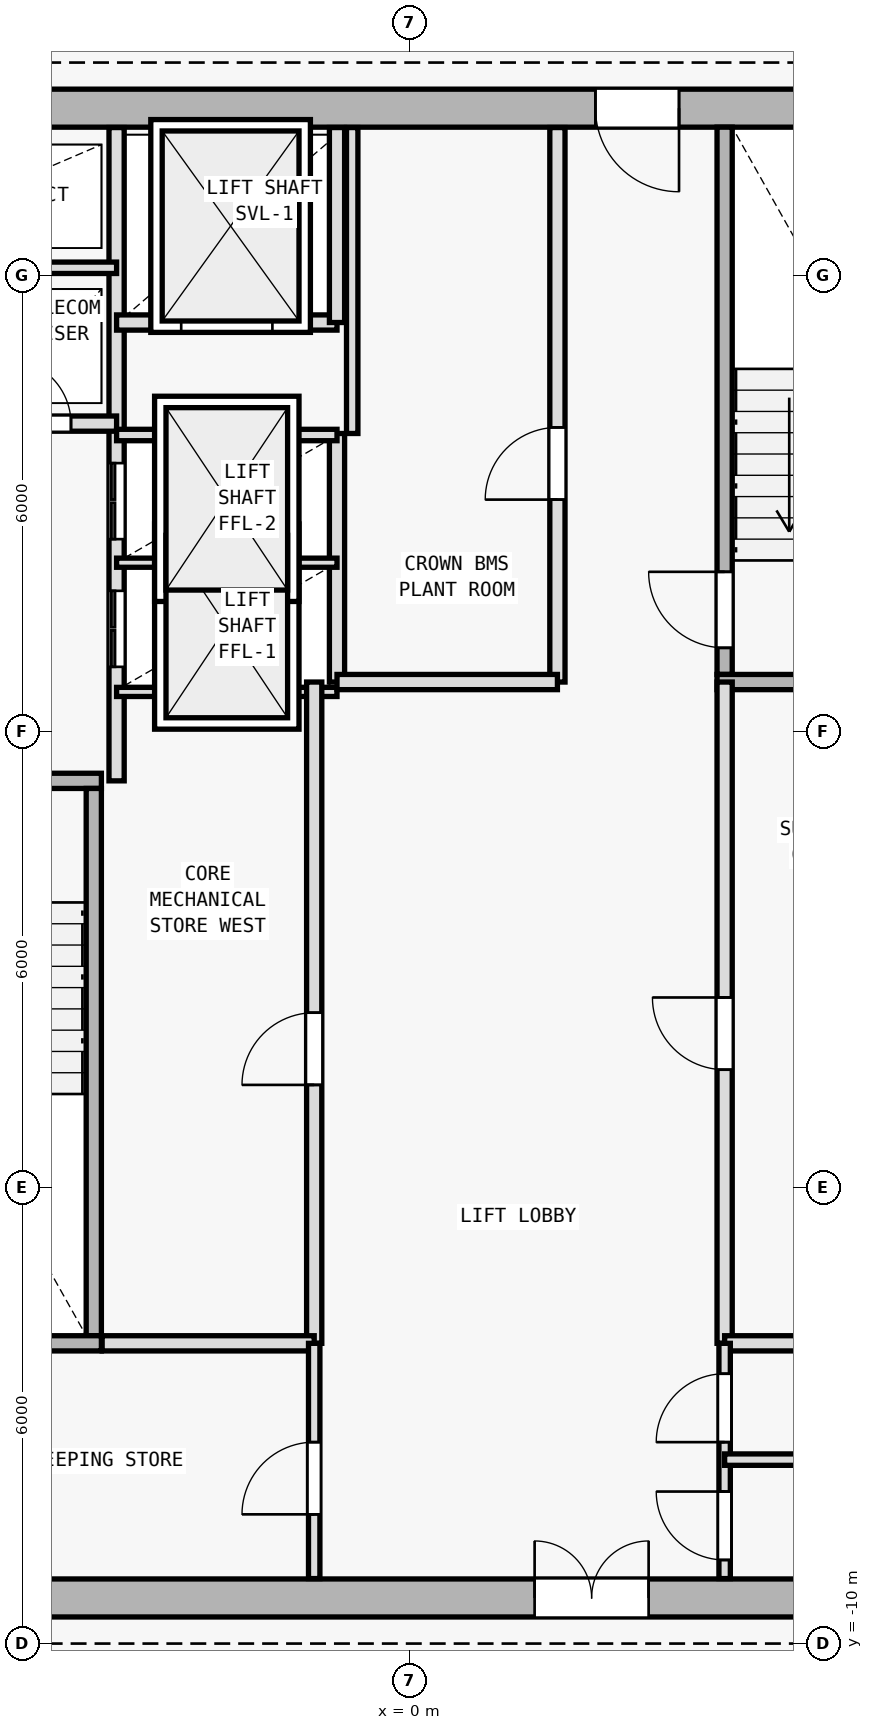
"""IFC4 building model, lengths in metres.
Left out: names, types, materials, properties, quantities, classifications, styles, units other than length and angle.
Written with IfcOpenShell. Run it as: python <this file> out.ifc"""

import sys

from ifc_helpers import new_model, si_unit, direction, frame, frame_2d, origin, origin_2d, place, context, subcontext, project, spatial, rectangle, i_section, extrude, element, fill, save


model = new_model("IFC4")
c1 = context("Model", 3, precision=1e-05, world=origin(), true_north=direction((0.0, 1.0)))
c2 = subcontext(c1, "Body", "Model", "MODEL_VIEW")
j1 = project(units=[si_unit("LENGTHUNIT", "METRE"), si_unit("PLANEANGLEUNIT", "RADIAN")], contexts=[c1])
p1 = place(None, origin())
s1 = spatial("IfcSite", under=j1, at=p1, CompositionType="ELEMENT")
p2 = place(p1, origin())
s2 = spatial("IfcBuilding", under=s1, at=p2, CompositionType="ELEMENT")
p3 = place(p2, frame((0.0, 0.0, 315.6)))
s3 = spatial("IfcBuildingStorey", under=s2, at=p3, CompositionType="ELEMENT", Elevation=315.6)
p4 = place(p3, frame((0.0, -9.4, 0.0), z_axis=(0.0, 0.0, 1.0), x_axis=(1.0, 0.0, 0.0)))
e1 = element("IfcColumn", 1, at=p4, inside=s3, PredefinedType="COLUMN", context=c2, shape_type="SweptSolid", body=[
    extrude(i_section(OverallWidth=0.374, OverallDepth=0.372, WebThickness=0.012, FlangeThickness=0.02, FilletRadius=0.015, at=origin_2d()), origin(), (0.0, 0.0, 1.0), 3.6),
])
p5 = place(p3, frame((-7.95, -9.4, 0.0), z_axis=(0.0, 0.0, 1.0), x_axis=(1.0, 0.0, 0.0)))
e2 = element("IfcWall", 2, at=p5, inside=s3, PredefinedType="SHEAR", context=c2, shape_type="SweptSolid", body=[
    extrude(rectangle(XDim=15.9, YDim=0.5, at=frame_2d((7.95, 0.0))), origin(), (0.0, 0.0, 1.0), 3.34),
])
p6 = place(p5, frame((9.6, 0.0, 0.0)))
e3 = element("IfcOpeningElement", 3, at=p6, cuts=e2, PredefinedType="OPENING", context=c2, shape_type="SweptSolid", body=[
    extrude(rectangle(XDim=1.5, YDim=2.2, at=frame_2d((0.75, 1.1))), frame((0.0, 0.26, 0.0), z_axis=(0.0, -1.0, 0.0), x_axis=(1.0, 0.0, 0.0)), (0.0, 0.0, 1.0), 0.52),
])
p7 = place(p3, frame((7.95, 10.2, 0.0), z_axis=(0.0, 0.0, 1.0), x_axis=(-1.0, 0.0, 0.0)))
e4 = element("IfcWall", 4, at=p7, inside=s3, PredefinedType="SHEAR", context=c2, shape_type="SweptSolid", body=[
    extrude(rectangle(XDim=15.9, YDim=0.5, at=frame_2d((7.95, 0.0))), origin(), (0.0, 0.0, 1.0), 3.34),
])
p8 = place(p7, frame((4.4, 0.0, 0.0)))
e5 = element("IfcOpeningElement", 5, at=p8, cuts=e4, PredefinedType="OPENING", context=c2, shape_type="SweptSolid", body=[
    extrude(rectangle(XDim=1.1, YDim=2.15, at=frame_2d((0.55, 1.075))), frame((0.0, 0.26, 0.0), z_axis=(0.0, -1.0, 0.0), x_axis=(1.0, 0.0, 0.0)), (0.0, 0.0, 1.0), 0.52),
])
p9 = place(p3, frame((-7.45, 1.35, 0.0), z_axis=(0.0, 0.0, 1.0), x_axis=(1.0, 0.0, 0.0)))
e6 = element("IfcWall", 6, at=p9, inside=s3, PredefinedType="SOLIDWALL", context=c2, shape_type="SweptSolid", body=[
    extrude(rectangle(XDim=3.4, YDim=0.2, at=frame_2d((1.7, 0.0))), origin(), (0.0, 0.0, 1.0), 3.34),
])
p10 = place(p9, frame((0.65, 0.0, 0.0)))
e7 = element("IfcOpeningElement", 7, at=p10, cuts=e6, PredefinedType="OPENING", context=c2, shape_type="SweptSolid", body=[
    extrude(rectangle(XDim=1.0, YDim=2.15, at=frame_2d((0.5, 1.075))), frame((0.0, 0.11, 0.0), z_axis=(0.0, -1.0, 0.0), x_axis=(1.0, 0.0, 0.0)), (0.0, 0.0, 1.0), 0.22),
])
p11 = place(p3, frame((-4.15, -5.95, 0.0), z_axis=(0.0, 0.0, 1.0), x_axis=(0.0, 1.0, 0.0)))
e8 = element("IfcWall", 8, at=p11, inside=s3, PredefinedType="SOLIDWALL", context=c2, shape_type="SweptSolid", body=[
    extrude(rectangle(XDim=7.2, YDim=0.2, at=frame_2d((3.6, 0.0))), origin(), (0.0, 0.0, 1.0), 3.34),
])
p12 = place(p3, frame((-3.85, 1.35, 0.0), z_axis=(0.0, 0.0, 1.0), x_axis=(0.0, 1.0, 0.0)))
e9 = element("IfcWall", 9, at=p12, inside=s3, PredefinedType="SOLIDWALL", context=c2, shape_type="SweptSolid", body=[
    extrude(rectangle(XDim=8.595, YDim=0.2, at=frame_2d((4.297, 0.0))), origin(), (0.0, 0.0, 1.0), 3.34),
])
p13 = place(p12, frame((1.5, 0.0, 0.0)))
e10 = element("IfcOpeningElement", 10, at=p13, cuts=e9, PredefinedType="OPENING", context=c2, shape_type="SweptSolid", body=[
    extrude(rectangle(XDim=1.0, YDim=2.15, at=frame_2d((0.5, 1.075))), frame((0.0, 0.11, 0.0), z_axis=(0.0, -1.0, 0.0), x_axis=(1.0, 0.0, 0.0)), (0.0, 0.0, 1.0), 0.22),
])
p14 = place(p12, frame((3.18, 0.0, 0.0)))
e11 = element("IfcOpeningElement", 11, at=p14, cuts=e9, PredefinedType="OPENING", context=c2, shape_type="SweptSolid", body=[
    extrude(rectangle(XDim=1.0, YDim=2.15, at=frame_2d((0.5, 1.075))), frame((0.0, 0.11, 0.0), z_axis=(0.0, -1.0, 0.0), x_axis=(1.0, 0.0, 0.0)), (0.0, 0.0, 1.0), 0.22),
])
p15 = place(p3, frame((-7.445, 6.05, 0.0), z_axis=(0.0, 0.0, 1.0), x_axis=(1.0, 0.0, 0.0)))
e12 = element("IfcWall", 12, at=p15, inside=s3, PredefinedType="SOLIDWALL", context=c2, shape_type="SweptSolid", body=[
    extrude(rectangle(XDim=3.595, YDim=0.2, at=frame_2d((1.797, 0.0))), origin(), (0.0, 0.0, 1.0), 3.34),
])
p16 = place(p15, frame((0.345, 0.0, 0.0)))
e13 = element("IfcOpeningElement", 13, at=p16, cuts=e12, PredefinedType="OPENING", context=c2, shape_type="SweptSolid", body=[
    extrude(rectangle(XDim=0.85, YDim=2.1, at=frame_2d((0.425, 1.05))), frame((0.0, 0.11, 0.0), z_axis=(0.0, -1.0, 0.0), x_axis=(1.0, 0.0, 0.0)), (0.0, 0.0, 1.0), 0.22),
])
p17 = place(p15, frame((2.145, 0.0, 0.0)))
e14 = element("IfcOpeningElement", 14, at=p17, cuts=e12, PredefinedType="OPENING", context=c2, shape_type="SweptSolid", body=[
    extrude(rectangle(XDim=0.85, YDim=2.1, at=frame_2d((0.425, 1.05))), frame((0.0, 0.11, 0.0), z_axis=(0.0, -1.0, 0.0), x_axis=(1.0, 0.0, 0.0)), (0.0, 0.0, 1.0), 0.22),
])
p18 = place(p3, frame((-7.445, 8.1, 0.0), z_axis=(0.0, 0.0, 1.0), x_axis=(1.0, 0.0, 0.0)))
e15 = element("IfcWall", 15, at=p18, inside=s3, PredefinedType="PARTITIONING", context=c2, shape_type="SweptSolid", body=[
    extrude(rectangle(XDim=3.595, YDim=0.15, at=frame_2d((1.797, 0.0))), origin(), (0.0, 0.0, 1.0), 3.34),
])
p19 = place(p3, frame((4.15, 2.75, 0.0), z_axis=(0.0, 0.0, 1.0), x_axis=(0.0, 1.0, 0.0)))
e16 = element("IfcWall", 16, at=p19, inside=s3, PredefinedType="SOLIDWALL", context=c2, shape_type="SweptSolid", body=[
    extrude(rectangle(XDim=7.2, YDim=0.2, at=frame_2d((3.6, 0.0))), origin(), (0.0, 0.0, 1.0), 3.34),
])
p20 = place(p19, frame((0.35, 0.0, 0.0)))
e17 = element("IfcOpeningElement", 17, at=p20, cuts=e16, PredefinedType="OPENING", context=c2, shape_type="SweptSolid", body=[
    extrude(rectangle(XDim=1.0, YDim=2.15, at=frame_2d((0.5, 1.075))), frame((0.0, 0.11, 0.0), z_axis=(0.0, -1.0, 0.0), x_axis=(1.0, 0.0, 0.0)), (0.0, 0.0, 1.0), 0.22),
])
p21 = place(p3, frame((4.05, 2.65, 0.0), z_axis=(0.0, 0.0, 1.0), x_axis=(1.0, 0.0, 0.0)))
e18 = element("IfcWall", 18, at=p21, inside=s3, PredefinedType="SOLIDWALL", context=c2, shape_type="SweptSolid", body=[
    extrude(rectangle(XDim=3.4, YDim=0.2, at=frame_2d((1.7, 0.0))), origin(), (0.0, 0.0, 1.0), 3.34),
])
p22 = place(p3, frame((-0.95, 2.65, 0.0), z_axis=(0.0, 0.0, 1.0), x_axis=(0.0, 1.0, 0.0)))
e19 = element("IfcWall", 19, at=p22, inside=s3, PredefinedType="SOLIDWALL", context=c2, shape_type="SweptSolid", body=[
    extrude(rectangle(XDim=3.27, YDim=0.2, at=frame_2d((1.635, 0.0))), origin(), (0.0, 0.0, 1.0), 3.34),
])
for number, where, z_axis, x_axis in (
    (20, (-3.85, 2.52, 0.0), (0.0, 0.0, 1.0), (1.0, 0.0, 0.0)),
    (21, (-3.85, 4.22, 0.0), (0.0, 0.0, 1.0), (1.0, 0.0, 0.0)),
):
    element("IfcWall", number, at=place(p3, frame(where, z_axis=z_axis, x_axis=x_axis)), inside=s3, PredefinedType="PARTITIONING", context=c2, shape_type="SweptSolid", body=[
        extrude(rectangle(XDim=2.9, YDim=0.12, at=frame_2d((1.45, 0.0))), origin(), (0.0, 0.0, 1.0), 3.34),
    ])
p23 = place(p3, frame((-3.85, 5.9, 0.0), z_axis=(0.0, 0.0, 1.0), x_axis=(1.0, 0.0, 0.0)))
e22 = element("IfcWall", 22, at=p23, inside=s3, PredefinedType="PARTITIONING", context=c2, shape_type="SweptSolid", body=[
    extrude(rectangle(XDim=2.9, YDim=0.15, at=frame_2d((1.45, 0.0))), origin(), (0.0, 0.0, 1.0), 3.34),
])
p24 = place(p3, frame((-3.85, 7.38, 0.0), z_axis=(0.0, 0.0, 1.0), x_axis=(1.0, 0.0, 0.0)))
e23 = element("IfcWall", 23, at=p24, inside=s3, PredefinedType="SOLIDWALL", context=c2, shape_type="SweptSolid", body=[
    extrude(rectangle(XDim=2.9, YDim=0.2, at=frame_2d((1.45, 0.0))), origin(), (0.0, 0.0, 1.0), 3.34),
])
p25 = place(p24, frame((0.85, 0.0, 0.0)))
e24 = element("IfcOpeningElement", 24, at=p25, cuts=e23, PredefinedType="OPENING", context=c2, shape_type="SweptSolid", body=[
    extrude(rectangle(XDim=1.2, YDim=2.2, at=frame_2d((0.6, 1.1))), frame((0.0, 0.11, 0.0), z_axis=(0.0, -1.0, 0.0), x_axis=(1.0, 0.0, 0.0)), (0.0, 0.0, 1.0), 0.22),
])
p26 = place(p3, frame((-0.95, 7.38, 0.0), z_axis=(0.0, 0.0, 1.0), x_axis=(0.0, 1.0, 0.0)))
e25 = element("IfcWall", 25, at=p26, inside=s3, PredefinedType="SOLIDWALL", context=c2, shape_type="SweptSolid", body=[
    extrude(rectangle(XDim=2.565, YDim=0.2, at=frame_2d((1.283, 0.0))), origin(), (0.0, 0.0, 1.0), 3.34),
])
p27 = place(p3, frame((4.15, -6.05, 0.0), z_axis=(0.0, 0.0, 1.0), x_axis=(0.0, 1.0, 0.0)))
e26 = element("IfcWall", 26, at=p27, inside=s3, PredefinedType="SOLIDWALL", context=c2, shape_type="SweptSolid", body=[
    extrude(rectangle(XDim=8.7, YDim=0.2, at=frame_2d((4.35, 0.0))), origin(), (0.0, 0.0, 1.0), 3.34),
])
p28 = place(p27, frame((3.6, 0.0, 0.0)))
e27 = element("IfcOpeningElement", 27, at=p28, cuts=e26, PredefinedType="OPENING", context=c2, shape_type="SweptSolid", body=[
    extrude(rectangle(XDim=0.95, YDim=2.1, at=frame_2d((0.475, 1.05))), frame((0.0, 0.11, 0.0), z_axis=(0.0, -1.0, 0.0), x_axis=(1.0, 0.0, 0.0)), (0.0, 0.0, 1.0), 0.22),
])
p29 = place(p3, frame((-1.25, -6.05, 0.0), z_axis=(0.0, 0.0, 1.0), x_axis=(0.0, 1.0, 0.0)))
e28 = element("IfcWall", 28, at=p29, inside=s3, PredefinedType="SOLIDWALL", context=c2, shape_type="SweptSolid", body=[
    extrude(rectangle(XDim=8.7, YDim=0.2, at=frame_2d((4.35, 0.0))), origin(), (0.0, 0.0, 1.0), 3.34),
])
p30 = place(p29, frame((3.4, 0.0, 0.0)))
e29 = element("IfcOpeningElement", 29, at=p30, cuts=e28, PredefinedType="OPENING", context=c2, shape_type="SweptSolid", body=[
    extrude(rectangle(XDim=0.95, YDim=2.1, at=frame_2d((0.475, 1.05))), frame((0.0, 0.11, 0.0), z_axis=(0.0, -1.0, 0.0), x_axis=(1.0, 0.0, 0.0)), (0.0, 0.0, 1.0), 0.22),
])
p31 = place(p3, frame((1.95, 2.65, 0.0), z_axis=(0.0, 0.0, 1.0), x_axis=(0.0, 1.0, 0.0)))
e30 = element("IfcWall", 30, at=p31, inside=s3, PredefinedType="SOLIDWALL", context=c2, shape_type="SweptSolid", body=[
    extrude(rectangle(XDim=7.295, YDim=0.2, at=frame_2d((3.647, 0.0))), origin(), (0.0, 0.0, 1.0), 3.34),
])
p32 = place(p31, frame((2.4, 0.0, 0.0)))
e31 = element("IfcOpeningElement", 31, at=p32, cuts=e30, PredefinedType="OPENING", context=c2, shape_type="SweptSolid", body=[
    extrude(rectangle(XDim=0.95, YDim=2.1, at=frame_2d((0.475, 1.05))), frame((0.0, 0.11, 0.0), z_axis=(0.0, -1.0, 0.0), x_axis=(1.0, 0.0, 0.0)), (0.0, 0.0, 1.0), 0.22),
])
p33 = place(p3, frame((-0.95, 2.65, 0.0), z_axis=(0.0, 0.0, 1.0), x_axis=(1.0, 0.0, 0.0)))
e32 = element("IfcWall", 32, at=p33, inside=s3, PredefinedType="SOLIDWALL", context=c2, shape_type="SweptSolid", body=[
    extrude(rectangle(XDim=2.9, YDim=0.2, at=frame_2d((1.45, 0.0))), origin(), (0.0, 0.0, 1.0), 3.34),
])
p34 = place(p3, frame((-0.75, 5.92, 0.0), z_axis=(0.0, 0.0, 1.0), x_axis=(0.0, 1.0, 0.0)))
e33 = element("IfcWall", 33, at=p34, inside=s3, PredefinedType="PARTITIONING", context=c2, shape_type="SweptSolid", body=[
    extrude(rectangle(XDim=4.025, YDim=0.15, at=frame_2d((2.013, 0.0))), origin(), (0.0, 0.0, 1.0), 3.34),
])
p35 = place(p3, frame((-7.45, -6.05, 0.0), z_axis=(0.0, 0.0, 1.0), x_axis=(1.0, 0.0, 0.0)))
e34 = element("IfcWall", 34, at=p35, inside=s3, PredefinedType="SOLIDWALL", context=c2, shape_type="SweptSolid", body=[
    extrude(rectangle(XDim=3.4, YDim=0.2, at=frame_2d((1.7, 0.0))), origin(), (0.0, 0.0, 1.0), 3.34),
])
p36 = place(p3, frame((-4.04, -6.05, 0.0), z_axis=(0.0, 0.0, 1.0), x_axis=(1.0, 0.0, 0.0)))
e35 = element("IfcWall", 35, at=p36, inside=s3, PredefinedType="SOLIDWALL", context=c2, shape_type="SweptSolid", body=[
    extrude(rectangle(XDim=2.79, YDim=0.2, at=frame_2d((1.395, 0.0))), origin(), (0.0, 0.0, 1.0), 3.34),
])
p37 = place(p3, frame((4.15, -6.05, 0.0), z_axis=(0.0, 0.0, 1.0), x_axis=(1.0, 0.0, 0.0)))
e36 = element("IfcWall", 36, at=p37, inside=s3, PredefinedType="SOLIDWALL", context=c2, shape_type="SweptSolid", body=[
    extrude(rectangle(XDim=3.295, YDim=0.2, at=frame_2d((1.647, 0.0))), origin(), (0.0, 0.0, 1.0), 3.34),
])
p38 = place(p3, frame((-1.25, -9.145, 0.0), z_axis=(0.0, 0.0, 1.0), x_axis=(0.0, 1.0, 0.0)))
e37 = element("IfcWall", 37, at=p38, inside=s3, PredefinedType="PARTITIONING", context=c2, shape_type="SweptSolid", body=[
    extrude(rectangle(XDim=3.095, YDim=0.15, at=frame_2d((1.547, 0.0))), origin(), (0.0, 0.0, 1.0), 3.34),
])
p39 = place(p38, frame((0.845, 0.0, 0.0)))
e38 = element("IfcOpeningElement", 38, at=p39, cuts=e37, PredefinedType="OPENING", context=c2, shape_type="SweptSolid", body=[
    extrude(rectangle(XDim=0.95, YDim=2.1, at=frame_2d((0.475, 1.05))), frame((0.0, 0.085, 0.0), z_axis=(0.0, -1.0, 0.0), x_axis=(1.0, 0.0, 0.0)), (0.0, 0.0, 1.0), 0.17),
])
p40 = place(p3, frame((4.15, -9.145, 0.0), z_axis=(0.0, 0.0, 1.0), x_axis=(0.0, 1.0, 0.0)))
e39 = element("IfcWall", 39, at=p40, inside=s3, PredefinedType="PARTITIONING", context=c2, shape_type="SweptSolid", body=[
    extrude(rectangle(XDim=3.095, YDim=0.15, at=frame_2d((1.547, 0.0))), origin(), (0.0, 0.0, 1.0), 3.34),
])
p41 = place(p40, frame((0.245, 0.0, 0.0)))
e40 = element("IfcOpeningElement", 40, at=p41, cuts=e39, PredefinedType="OPENING", context=c2, shape_type="SweptSolid", body=[
    extrude(rectangle(XDim=0.9, YDim=2.1, at=frame_2d((0.45, 1.05))), frame((0.0, 0.085, 0.0), z_axis=(0.0, -1.0, 0.0), x_axis=(1.0, 0.0, 0.0)), (0.0, 0.0, 1.0), 0.17),
])
p42 = place(p40, frame((1.795, 0.0, 0.0)))
e41 = element("IfcOpeningElement", 41, at=p42, cuts=e39, PredefinedType="OPENING", context=c2, shape_type="SweptSolid", body=[
    extrude(rectangle(XDim=0.9, YDim=2.1, at=frame_2d((0.45, 1.05))), frame((0.0, 0.085, 0.0), z_axis=(0.0, -1.0, 0.0), x_axis=(1.0, 0.0, 0.0)), (0.0, 0.0, 1.0), 0.17),
])
p43 = place(p3, frame((4.15, -7.58, 0.0), z_axis=(0.0, 0.0, 1.0), x_axis=(1.0, 0.0, 0.0)))
e42 = element("IfcWall", 42, at=p43, inside=s3, PredefinedType="PARTITIONING", context=c2, shape_type="SweptSolid", body=[
    extrude(rectangle(XDim=3.295, YDim=0.15, at=frame_2d((1.647, 0.0))), origin(), (0.0, 0.0, 1.0), 3.34),
])
p44 = place(p6, origin())
e43 = element("IfcDoor", 43, at=p44, inside=s3, OperationType="DOUBLE_DOOR_SINGLE_SWING", PredefinedType="DOOR", context=c2, shape_type="SweptSolid", body=[
    extrude(rectangle(XDim=1.5, YDim=2.2, at=frame_2d((0.75, 1.1))), frame((0.0, 0.025, 0.0), z_axis=(0.0, -1.0, 0.0), x_axis=(1.0, 0.0, 0.0)), (0.0, 0.0, 1.0), 0.05),
])
fill(e3, e43)
p45 = place(p8, origin())
e44 = element("IfcDoor", 44, at=p45, inside=s3, OperationType="SINGLE_SWING_LEFT", PredefinedType="DOOR", context=c2, shape_type="SweptSolid", body=[
    extrude(rectangle(XDim=1.1, YDim=2.15, at=frame_2d((0.55, 1.075))), frame((0.0, 0.025, 0.0), z_axis=(0.0, -1.0, 0.0), x_axis=(1.0, 0.0, 0.0)), (0.0, 0.0, 1.0), 0.05),
])
fill(e5, e44)
p46 = place(p17, origin())
e45 = element("IfcDoor", 45, at=p46, inside=s3, OperationType="SINGLE_SWING_LEFT", PredefinedType="DOOR", context=c2, shape_type="SweptSolid", body=[
    extrude(rectangle(XDim=0.85, YDim=2.1, at=frame_2d((0.425, 1.05))), frame((0.0, 0.025, 0.0), z_axis=(0.0, -1.0, 0.0), x_axis=(1.0, 0.0, 0.0)), (0.0, 0.0, 1.0), 0.05),
])
fill(e14, e45)
p47 = place(p20, origin())
e46 = element("IfcDoor", 46, at=p47, inside=s3, OperationType="SINGLE_SWING_RIGHT", PredefinedType="DOOR", context=c2, shape_type="SweptSolid", body=[
    extrude(rectangle(XDim=1.0, YDim=2.15, at=frame_2d((0.5, 1.075))), frame((0.0, 0.025, 0.0), z_axis=(0.0, -1.0, 0.0), x_axis=(1.0, 0.0, 0.0)), (0.0, 0.0, 1.0), 0.05),
])
fill(e17, e46)
p48 = place(p25, origin())
e47 = element("IfcDoor", 47, at=p48, inside=s3, OperationType="DOUBLE_DOOR_SLIDING", PredefinedType="DOOR", context=c2, shape_type="SweptSolid", body=[
    extrude(rectangle(XDim=1.2, YDim=2.2, at=frame_2d((0.6, 1.1))), frame((0.0, 0.025, 0.0), z_axis=(0.0, -1.0, 0.0), x_axis=(1.0, 0.0, 0.0)), (0.0, 0.0, 1.0), 0.05),
])
fill(e24, e47)
p49 = place(p28, origin())
e48 = element("IfcDoor", 48, at=p49, inside=s3, OperationType="SINGLE_SWING_RIGHT", PredefinedType="DOOR", context=c2, shape_type="SweptSolid", body=[
    extrude(rectangle(XDim=0.95, YDim=2.1, at=frame_2d((0.475, 1.05))), frame((0.0, 0.025, 0.0), z_axis=(0.0, -1.0, 0.0), x_axis=(1.0, 0.0, 0.0)), (0.0, 0.0, 1.0), 0.05),
])
fill(e27, e48)
p50 = place(p30, origin())
e49 = element("IfcDoor", 49, at=p50, inside=s3, OperationType="SINGLE_SWING_LEFT", PredefinedType="DOOR", context=c2, shape_type="SweptSolid", body=[
    extrude(rectangle(XDim=0.95, YDim=2.1, at=frame_2d((0.475, 1.05))), frame((0.0, 0.025, 0.0), z_axis=(0.0, -1.0, 0.0), x_axis=(1.0, 0.0, 0.0)), (0.0, 0.0, 1.0), 0.05),
])
fill(e29, e49)
p51 = place(p32, origin())
e50 = element("IfcDoor", 50, at=p51, inside=s3, OperationType="SINGLE_SWING_LEFT", PredefinedType="DOOR", context=c2, shape_type="SweptSolid", body=[
    extrude(rectangle(XDim=0.95, YDim=2.1, at=frame_2d((0.475, 1.05))), frame((0.0, 0.025, 0.0), z_axis=(0.0, -1.0, 0.0), x_axis=(1.0, 0.0, 0.0)), (0.0, 0.0, 1.0), 0.05),
])
fill(e31, e50)
p52 = place(p13, origin())
e51 = element("IfcDoor", 51, at=p52, inside=s3, OperationType="DOUBLE_DOOR_SLIDING", PredefinedType="DOOR", context=c2, shape_type="SweptSolid", body=[
    extrude(rectangle(XDim=1.0, YDim=2.15, at=frame_2d((0.5, 1.075))), frame((0.0, 0.025, 0.0), z_axis=(0.0, -1.0, 0.0), x_axis=(1.0, 0.0, 0.0)), (0.0, 0.0, 1.0), 0.05),
])
fill(e10, e51)
p53 = place(p14, origin())
e52 = element("IfcDoor", 52, at=p53, inside=s3, OperationType="DOUBLE_DOOR_SLIDING", PredefinedType="DOOR", context=c2, shape_type="SweptSolid", body=[
    extrude(rectangle(XDim=1.0, YDim=2.15, at=frame_2d((0.5, 1.075))), frame((0.0, 0.025, 0.0), z_axis=(0.0, -1.0, 0.0), x_axis=(1.0, 0.0, 0.0)), (0.0, 0.0, 1.0), 0.05),
])
fill(e11, e52)
p54 = place(p39, origin())
e53 = element("IfcDoor", 53, at=p54, inside=s3, OperationType="SINGLE_SWING_LEFT", PredefinedType="DOOR", context=c2, shape_type="SweptSolid", body=[
    extrude(rectangle(XDim=0.95, YDim=2.1, at=frame_2d((0.475, 1.05))), frame((0.0, 0.025, 0.0), z_axis=(0.0, -1.0, 0.0), x_axis=(1.0, 0.0, 0.0)), (0.0, 0.0, 1.0), 0.05),
])
fill(e38, e53)
p55 = place(p41, origin())
e54 = element("IfcDoor", 54, at=p55, inside=s3, OperationType="SINGLE_SWING_RIGHT", PredefinedType="DOOR", context=c2, shape_type="SweptSolid", body=[
    extrude(rectangle(XDim=0.9, YDim=2.1, at=frame_2d((0.45, 1.05))), frame((0.0, 0.025, 0.0), z_axis=(0.0, -1.0, 0.0), x_axis=(1.0, 0.0, 0.0)), (0.0, 0.0, 1.0), 0.05),
])
fill(e40, e54)
p56 = place(p42, origin())
e55 = element("IfcDoor", 55, at=p56, inside=s3, OperationType="SINGLE_SWING_LEFT", PredefinedType="DOOR", context=c2, shape_type="SweptSolid", body=[
    extrude(rectangle(XDim=0.9, YDim=2.1, at=frame_2d((0.45, 1.05))), frame((0.0, 0.025, 0.0), z_axis=(0.0, -1.0, 0.0), x_axis=(1.0, 0.0, 0.0)), (0.0, 0.0, 1.0), 0.05),
])
fill(e41, e55)
save(model, sys.argv[1])
